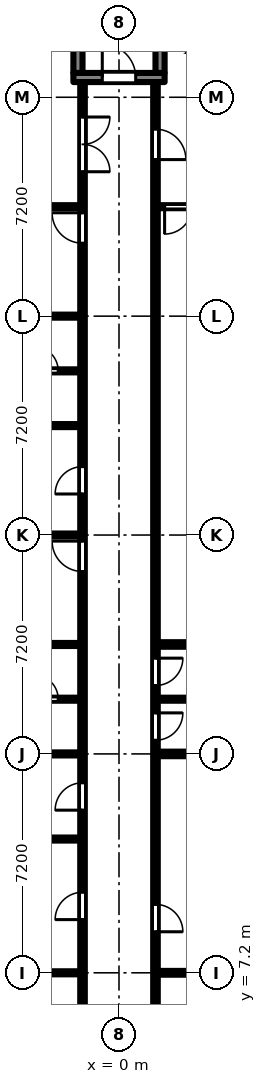
"""IFC4 building model, lengths in metres.
Left out: names, types, materials, properties, quantities, classifications, styles, units other than length and angle.
Written with IfcOpenShell. Run it as: python <this file> out.ifc"""

import sys

from ifc_helpers import new_model, si_unit, direction, frame, frame_2d, origin, place, context, subcontext, project, spatial, rectangle, extrude, element, fill, save


model = new_model("IFC4")
c1 = context("Model", 3, precision=1e-05, world=origin(), true_north=direction((0.0, 1.0)))
c2 = subcontext(c1, "Body", "Model", "MODEL_VIEW")
j1 = project(units=[si_unit("LENGTHUNIT", "METRE"), si_unit("PLANEANGLEUNIT", "RADIAN")], contexts=[c1])
p1 = place(None, origin())
s1 = spatial("IfcSite", under=j1, at=p1, CompositionType="ELEMENT")
p2 = place(p1, origin())
s2 = spatial("IfcBuilding", under=s1, at=p2, CompositionType="ELEMENT")
p3 = place(p2, frame((0.0, 0.0, 59.7)))
s3 = spatial("IfcBuildingStorey", under=s2, at=p3, CompositionType="ELEMENT", Elevation=59.7)
p4 = place(p3, frame((-1.5, 36.65, 0.0), z_axis=(0.0, 0.0, 1.0), x_axis=(1.0, 0.0, 0.0)))
e1 = element("IfcWall", 1, at=p4, inside=s3, PredefinedType="SHEAR", context=c2, shape_type="SweptSolid", body=[
    extrude(rectangle(XDim=3.0, YDim=0.3, at=frame_2d((1.5, 0.0))), origin(), (0.0, 0.0, 1.0), 2.55),
])
p5 = place(p4, frame((0.95, 0.0, 0.0)))
e2 = element("IfcOpeningElement", 2, at=p5, cuts=e1, PredefinedType="OPENING", context=c2, shape_type="SweptSolid", body=[
    extrude(rectangle(XDim=1.1, YDim=2.1, at=frame_2d((0.55, 1.05))), frame((0.0, 0.16, 0.0), z_axis=(0.0, -1.0, 0.0), x_axis=(1.0, 0.0, 0.0)), (0.0, 0.0, 1.0), 0.32),
])
for number, where, z_axis, x_axis in (
    (3, (-1.35, 36.8, 0.0), (0.0, 0.0, 1.0), (0.0, 1.0, 0.0)),
    (4, (1.35, 36.8, 0.0), (0.0, 0.0, 1.0), (0.0, 1.0, 0.0)),
):
    element("IfcWall", number, at=place(p3, frame(where, z_axis=z_axis, x_axis=x_axis)), inside=s3, PredefinedType="SHEAR", context=c2, shape_type="SweptSolid", body=[
        extrude(rectangle(XDim=5.8, YDim=0.3, at=frame_2d((2.9, 0.0))), origin(), (0.0, 0.0, 1.0), 2.55),
    ])
for number, where, z_axis, x_axis in (
    (5, (-6.9, 21.6, 0.0), (0.0, 0.0, 1.0), (1.0, 0.0, 0.0)),
    (6, (-6.9, 25.2, 0.0), (0.0, 0.0, 1.0), (1.0, 0.0, 0.0)),
    (7, (-6.9, 32.4, 0.0), (0.0, 0.0, 1.0), (1.0, 0.0, 0.0)),
):
    element("IfcWall", number, at=place(p3, frame(where, z_axis=z_axis, x_axis=x_axis)), inside=s3, PredefinedType="PARTITIONING", context=c2, shape_type="SweptSolid", body=[
        extrude(rectangle(XDim=5.625, YDim=0.1, at=frame_2d((2.812, 0.0))), origin(), (0.0, 0.0, 1.0), 2.55),
    ])
for number, where, z_axis, x_axis in (
    (8, (-3.9, 7.2, 0.0), (0.0, 0.0, 1.0), (1.0, 0.0, 0.0)),
    (9, (-3.9, 11.6, 0.0), (0.0, 0.0, 1.0), (1.0, 0.0, 0.0)),
    (10, (-3.9, 14.4, 0.0), (0.0, 0.0, 1.0), (1.0, 0.0, 0.0)),
):
    element("IfcWall", number, at=place(p3, frame(where, z_axis=z_axis, x_axis=x_axis)), inside=s3, PredefinedType="PARTITIONING", context=c2, shape_type="SweptSolid", body=[
        extrude(rectangle(XDim=2.625, YDim=0.1, at=frame_2d((1.312, 0.0))), origin(), (0.0, 0.0, 1.0), 2.55),
    ])
p6 = place(p3, frame((-3.55, 16.2, 0.0), z_axis=(0.0, 0.0, 1.0), x_axis=(1.0, 0.0, 0.0)))
e11 = element("IfcWall", 11, at=p6, inside=s3, PredefinedType="PARTITIONING", context=c2, shape_type="SweptSolid", body=[
    extrude(rectangle(XDim=2.275, YDim=0.1, at=frame_2d((1.138, 0.0))), origin(), (0.0, 0.0, 1.0), 2.55),
])
p7 = place(p6, frame((0.75, 0.0, 0.0)))
e12 = element("IfcOpeningElement", 12, at=p7, cuts=e11, PredefinedType="OPENING", context=c2, shape_type="SweptSolid", body=[
    extrude(rectangle(XDim=0.8, YDim=2.1, at=frame_2d((0.4, 1.05))), frame((0.0, 0.06, 0.0), z_axis=(0.0, -1.0, 0.0), x_axis=(1.0, 0.0, 0.0)), (0.0, 0.0, 1.0), 0.12),
])
p8 = place(p3, frame((-3.55, 18.0, 0.0), z_axis=(0.0, 0.0, 1.0), x_axis=(1.0, 0.0, 0.0)))
e13 = element("IfcWall", 13, at=p8, inside=s3, PredefinedType="PARTITIONING", context=c2, shape_type="SweptSolid", body=[
    extrude(rectangle(XDim=2.275, YDim=0.1, at=frame_2d((1.138, 0.0))), origin(), (0.0, 0.0, 1.0), 2.55),
])
p9 = place(p3, frame((-3.55, 27.0, 0.0), z_axis=(0.0, 0.0, 1.0), x_axis=(1.0, 0.0, 0.0)))
e14 = element("IfcWall", 14, at=p9, inside=s3, PredefinedType="PARTITIONING", context=c2, shape_type="SweptSolid", body=[
    extrude(rectangle(XDim=2.275, YDim=0.1, at=frame_2d((1.138, 0.0))), origin(), (0.0, 0.0, 1.0), 2.55),
])
p10 = place(p9, frame((0.75, 0.0, 0.0)))
e15 = element("IfcOpeningElement", 15, at=p10, cuts=e14, PredefinedType="OPENING", context=c2, shape_type="SweptSolid", body=[
    extrude(rectangle(XDim=0.8, YDim=2.1, at=frame_2d((0.4, 1.05))), frame((0.0, 0.06, 0.0), z_axis=(0.0, -1.0, 0.0), x_axis=(1.0, 0.0, 0.0)), (0.0, 0.0, 1.0), 0.12),
])
p11 = place(p3, frame((-3.55, 28.8, 0.0), z_axis=(0.0, 0.0, 1.0), x_axis=(1.0, 0.0, 0.0)))
e16 = element("IfcWall", 16, at=p11, inside=s3, PredefinedType="PARTITIONING", context=c2, shape_type="SweptSolid", body=[
    extrude(rectangle(XDim=2.275, YDim=0.1, at=frame_2d((1.138, 0.0))), origin(), (0.0, 0.0, 1.0), 2.55),
])
p12 = place(p3, frame((-1.2, 1.275, 0.0), z_axis=(0.0, 0.0, 1.0), x_axis=(0.0, 1.0, 0.0)))
e17 = element("IfcWall", 17, at=p12, inside=s3, PredefinedType="PARTITIONING", context=c2, shape_type="SweptSolid", body=[
    extrude(rectangle(XDim=35.225, YDim=0.15, at=frame_2d((17.613, 0.0))), origin(), (0.0, 0.0, 1.0), 2.55),
])
p13 = place(p12, frame((2.475, 0.0, 0.0)))
e18 = element("IfcOpeningElement", 18, at=p13, cuts=e17, PredefinedType="OPENING", context=c2, shape_type="SweptSolid", body=[
    extrude(rectangle(XDim=0.9, YDim=2.1, at=frame_2d((0.45, 1.05))), frame((0.0, 0.085, 0.0), z_axis=(0.0, -1.0, 0.0), x_axis=(1.0, 0.0, 0.0)), (0.0, 0.0, 1.0), 0.17),
])
p14 = place(p12, frame((11.275, 0.0, 0.0)))
e19 = element("IfcOpeningElement", 19, at=p14, cuts=e17, PredefinedType="OPENING", context=c2, shape_type="SweptSolid", body=[
    extrude(rectangle(XDim=0.9, YDim=2.1, at=frame_2d((0.45, 1.05))), frame((0.0, 0.085, 0.0), z_axis=(0.0, -1.0, 0.0), x_axis=(1.0, 0.0, 0.0)), (0.0, 0.0, 1.0), 0.17),
])
p15 = place(p12, frame((7.675, 0.0, 0.0)))
e20 = element("IfcOpeningElement", 20, at=p15, cuts=e17, PredefinedType="OPENING", context=c2, shape_type="SweptSolid", body=[
    extrude(rectangle(XDim=0.9, YDim=2.1, at=frame_2d((0.45, 1.05))), frame((0.0, 0.085, 0.0), z_axis=(0.0, -1.0, 0.0), x_axis=(1.0, 0.0, 0.0)), (0.0, 0.0, 1.0), 0.17),
])
p16 = place(p12, frame((19.125, 0.0, 0.0)))
e21 = element("IfcOpeningElement", 21, at=p16, cuts=e17, PredefinedType="OPENING", context=c2, shape_type="SweptSolid", body=[
    extrude(rectangle(XDim=1.0, YDim=2.1, at=frame_2d((0.5, 1.05))), frame((0.0, 0.085, 0.0), z_axis=(0.0, -1.0, 0.0), x_axis=(1.0, 0.0, 0.0)), (0.0, 0.0, 1.0), 0.17),
])
p17 = place(p12, frame((21.675, 0.0, 0.0)))
e22 = element("IfcOpeningElement", 22, at=p17, cuts=e17, PredefinedType="OPENING", context=c2, shape_type="SweptSolid", body=[
    extrude(rectangle(XDim=0.9, YDim=2.1, at=frame_2d((0.45, 1.05))), frame((0.0, 0.085, 0.0), z_axis=(0.0, -1.0, 0.0), x_axis=(1.0, 0.0, 0.0)), (0.0, 0.0, 1.0), 0.17),
])
p18 = place(p12, frame((29.925, 0.0, 0.0)))
e23 = element("IfcOpeningElement", 23, at=p18, cuts=e17, PredefinedType="OPENING", context=c2, shape_type="SweptSolid", body=[
    extrude(rectangle(XDim=1.0, YDim=2.1, at=frame_2d((0.5, 1.05))), frame((0.0, 0.085, 0.0), z_axis=(0.0, -1.0, 0.0), x_axis=(1.0, 0.0, 0.0)), (0.0, 0.0, 1.0), 0.17),
])
p19 = place(p12, frame((32.275, 0.0, 0.0)))
e24 = element("IfcOpeningElement", 24, at=p19, cuts=e17, PredefinedType="OPENING", context=c2, shape_type="SweptSolid", body=[
    extrude(rectangle(XDim=1.8, YDim=2.1, at=frame_2d((0.9, 1.05))), frame((0.0, 0.085, 0.0), z_axis=(0.0, -1.0, 0.0), x_axis=(1.0, 0.0, 0.0)), (0.0, 0.0, 1.0), 0.17),
])
p20 = place(p3, frame((1.2, 1.125, 0.0), z_axis=(0.0, 0.0, 1.0), x_axis=(0.0, 1.0, 0.0)))
e25 = element("IfcWall", 25, at=p20, inside=s3, PredefinedType="PARTITIONING", context=c2, shape_type="SweptSolid", body=[
    extrude(rectangle(XDim=35.375, YDim=0.15, at=frame_2d((17.688, 0.0))), origin(), (0.0, 0.0, 1.0), 2.55),
])
p21 = place(p20, frame((2.625, 0.0, 0.0)))
e26 = element("IfcOpeningElement", 26, at=p21, cuts=e25, PredefinedType="OPENING", context=c2, shape_type="SweptSolid", body=[
    extrude(rectangle(XDim=0.9, YDim=2.1, at=frame_2d((0.45, 1.05))), frame((0.0, 0.085, 0.0), z_axis=(0.0, -1.0, 0.0), x_axis=(1.0, 0.0, 0.0)), (0.0, 0.0, 1.0), 0.17),
])
p22 = place(p20, frame((7.425, 0.0, 0.0)))
e27 = element("IfcOpeningElement", 27, at=p22, cuts=e25, PredefinedType="OPENING", context=c2, shape_type="SweptSolid", body=[
    extrude(rectangle(XDim=0.9, YDim=2.1, at=frame_2d((0.45, 1.05))), frame((0.0, 0.085, 0.0), z_axis=(0.0, -1.0, 0.0), x_axis=(1.0, 0.0, 0.0)), (0.0, 0.0, 1.0), 0.17),
])
p23 = place(p20, frame((13.725, 0.0, 0.0)))
e28 = element("IfcOpeningElement", 28, at=p23, cuts=e25, PredefinedType="OPENING", context=c2, shape_type="SweptSolid", body=[
    extrude(rectangle(XDim=0.9, YDim=2.1, at=frame_2d((0.45, 1.05))), frame((0.0, 0.085, 0.0), z_axis=(0.0, -1.0, 0.0), x_axis=(1.0, 0.0, 0.0)), (0.0, 0.0, 1.0), 0.17),
])
p24 = place(p20, frame((15.525, 0.0, 0.0)))
e29 = element("IfcOpeningElement", 29, at=p24, cuts=e25, PredefinedType="OPENING", context=c2, shape_type="SweptSolid", body=[
    extrude(rectangle(XDim=0.9, YDim=2.1, at=frame_2d((0.45, 1.05))), frame((0.0, 0.085, 0.0), z_axis=(0.0, -1.0, 0.0), x_axis=(1.0, 0.0, 0.0)), (0.0, 0.0, 1.0), 0.17),
])
p25 = place(p20, frame((32.825, 0.0, 0.0)))
e30 = element("IfcOpeningElement", 30, at=p25, cuts=e25, PredefinedType="OPENING", context=c2, shape_type="SweptSolid", body=[
    extrude(rectangle(XDim=1.0, YDim=2.1, at=frame_2d((0.5, 1.05))), frame((0.0, 0.085, 0.0), z_axis=(0.0, -1.0, 0.0), x_axis=(1.0, 0.0, 0.0)), (0.0, 0.0, 1.0), 0.17),
])
p26 = place(p3, frame((1.275, 7.2, 0.0), z_axis=(0.0, 0.0, 1.0), x_axis=(1.0, 0.0, 0.0)))
e31 = element("IfcWall", 31, at=p26, inside=s3, PredefinedType="PARTITIONING", context=c2, shape_type="SweptSolid", body=[
    extrude(rectangle(XDim=2.625, YDim=0.125, at=frame_2d((1.312, 0.0))), origin(), (0.0, 0.0, 1.0), 2.55),
])
p27 = place(p3, frame((1.275, 14.4, 0.0), z_axis=(0.0, 0.0, 1.0), x_axis=(1.0, 0.0, 0.0)))
e32 = element("IfcWall", 32, at=p27, inside=s3, PredefinedType="PARTITIONING", context=c2, shape_type="SweptSolid", body=[
    extrude(rectangle(XDim=2.625, YDim=0.15, at=frame_2d((1.312, 0.0))), origin(), (0.0, 0.0, 1.0), 2.55),
])
p28 = place(p3, frame((1.275, 16.2, 0.0), z_axis=(0.0, 0.0, 1.0), x_axis=(1.0, 0.0, 0.0)))
e33 = element("IfcWall", 33, at=p28, inside=s3, PredefinedType="PARTITIONING", context=c2, shape_type="SweptSolid", body=[
    extrude(rectangle(XDim=5.625, YDim=0.1, at=frame_2d((2.812, 0.0))), origin(), (0.0, 0.0, 1.0), 2.55),
])
p29 = place(p3, frame((1.275, 18.0, 0.0), z_axis=(0.0, 0.0, 1.0), x_axis=(1.0, 0.0, 0.0)))
e34 = element("IfcWall", 34, at=p29, inside=s3, PredefinedType="PARTITIONING", context=c2, shape_type="SweptSolid", body=[
    extrude(rectangle(XDim=5.625, YDim=0.15, at=frame_2d((2.812, 0.0))), origin(), (0.0, 0.0, 1.0), 2.55),
])
p30 = place(p3, frame((1.275, 32.4, 0.0), z_axis=(0.0, 0.0, 1.0), x_axis=(1.0, 0.0, 0.0)))
e35 = element("IfcWall", 35, at=p30, inside=s3, PredefinedType="PARTITIONING", context=c2, shape_type="SweptSolid", body=[
    extrude(rectangle(XDim=5.625, YDim=0.1, at=frame_2d((2.812, 0.0))), origin(), (0.0, 0.0, 1.0), 2.55),
])
p31 = place(p30, frame((0.225, 0.0, 0.0)))
e36 = element("IfcOpeningElement", 36, at=p31, cuts=e35, PredefinedType="OPENING", context=c2, shape_type="SweptSolid", body=[
    extrude(rectangle(XDim=0.9, YDim=2.1, at=frame_2d((0.45, 1.05))), frame((0.0, 0.06, 0.0), z_axis=(0.0, -1.0, 0.0), x_axis=(1.0, 0.0, 0.0)), (0.0, 0.0, 1.0), 0.12),
])
p32 = place(p5, origin())
e37 = element("IfcDoor", 37, at=p32, inside=s3, OperationType="SINGLE_SWING_LEFT", PredefinedType="DOOR", context=c2, shape_type="SweptSolid", body=[
    extrude(rectangle(XDim=1.1, YDim=2.1, at=frame_2d((0.55, 1.05))), frame((0.0, 0.025, 0.0), z_axis=(0.0, -1.0, 0.0), x_axis=(1.0, 0.0, 0.0)), (0.0, 0.0, 1.0), 0.05),
])
fill(e2, e37)
p33 = place(p14, origin())
e38 = element("IfcDoor", 38, at=p33, inside=s3, OperationType="SINGLE_SWING_LEFT", PredefinedType="DOOR", context=c2, shape_type="SweptSolid", body=[
    extrude(rectangle(XDim=0.9, YDim=2.1, at=frame_2d((0.45, 1.05))), frame((0.0, 0.025, 0.0), z_axis=(0.0, -1.0, 0.0), x_axis=(1.0, 0.0, 0.0)), (0.0, 0.0, 1.0), 0.05),
])
fill(e19, e38)
p34 = place(p15, origin())
e39 = element("IfcDoor", 39, at=p34, inside=s3, OperationType="SINGLE_SWING_LEFT", PredefinedType="DOOR", context=c2, shape_type="SweptSolid", body=[
    extrude(rectangle(XDim=0.9, YDim=2.1, at=frame_2d((0.45, 1.05))), frame((0.0, 0.025, 0.0), z_axis=(0.0, -1.0, 0.0), x_axis=(1.0, 0.0, 0.0)), (0.0, 0.0, 1.0), 0.05),
])
fill(e20, e39)
p35 = place(p7, origin())
e40 = element("IfcDoor", 40, at=p35, inside=s3, OperationType="SINGLE_SWING_LEFT", PredefinedType="DOOR", context=c2, shape_type="SweptSolid", body=[
    extrude(rectangle(XDim=0.8, YDim=2.1, at=frame_2d((0.4, 1.05))), frame((0.0, 0.025, 0.0), z_axis=(0.0, -1.0, 0.0), x_axis=(1.0, 0.0, 0.0)), (0.0, 0.0, 1.0), 0.05),
])
fill(e12, e40)
p36 = place(p16, origin())
e41 = element("IfcDoor", 41, at=p36, inside=s3, OperationType="SINGLE_SWING_RIGHT", PredefinedType="DOOR", context=c2, shape_type="SweptSolid", body=[
    extrude(rectangle(XDim=1.0, YDim=2.1, at=frame_2d((0.5, 1.05))), frame((0.0, 0.025, 0.0), z_axis=(0.0, -1.0, 0.0), x_axis=(1.0, 0.0, 0.0)), (0.0, 0.0, 1.0), 0.05),
])
fill(e21, e41)
p37 = place(p17, origin())
e42 = element("IfcDoor", 42, at=p37, inside=s3, OperationType="SINGLE_SWING_LEFT", PredefinedType="DOOR", context=c2, shape_type="SweptSolid", body=[
    extrude(rectangle(XDim=0.9, YDim=2.1, at=frame_2d((0.45, 1.05))), frame((0.0, 0.025, 0.0), z_axis=(0.0, -1.0, 0.0), x_axis=(1.0, 0.0, 0.0)), (0.0, 0.0, 1.0), 0.05),
])
fill(e22, e42)
p38 = place(p10, origin())
e43 = element("IfcDoor", 43, at=p38, inside=s3, OperationType="SINGLE_SWING_LEFT", PredefinedType="DOOR", context=c2, shape_type="SweptSolid", body=[
    extrude(rectangle(XDim=0.8, YDim=2.1, at=frame_2d((0.4, 1.05))), frame((0.0, 0.025, 0.0), z_axis=(0.0, -1.0, 0.0), x_axis=(1.0, 0.0, 0.0)), (0.0, 0.0, 1.0), 0.05),
])
fill(e15, e43)
p39 = place(p18, origin())
e44 = element("IfcDoor", 44, at=p39, inside=s3, OperationType="SINGLE_SWING_RIGHT", PredefinedType="DOOR", context=c2, shape_type="SweptSolid", body=[
    extrude(rectangle(XDim=1.0, YDim=2.1, at=frame_2d((0.5, 1.05))), frame((0.0, 0.025, 0.0), z_axis=(0.0, -1.0, 0.0), x_axis=(1.0, 0.0, 0.0)), (0.0, 0.0, 1.0), 0.05),
])
fill(e23, e44)
p40 = place(p19, frame((1.8, 0.0, 0.0), z_axis=(0.0, 0.0, 1.0), x_axis=(-1.0, 0.0, 0.0)))
e45 = element("IfcDoor", 45, at=p40, inside=s3, OperationType="DOUBLE_DOOR_DOUBLE_SWING", PredefinedType="DOOR", context=c2, shape_type="SweptSolid", body=[
    extrude(rectangle(XDim=1.8, YDim=2.1, at=frame_2d((0.9, 1.05))), frame((0.0, 0.025, 0.0), z_axis=(0.0, -1.0, 0.0), x_axis=(1.0, 0.0, 0.0)), (0.0, 0.0, 1.0), 0.05),
])
fill(e24, e45)
p41 = place(p22, frame((0.9, 0.0, 0.0), z_axis=(0.0, 0.0, 1.0), x_axis=(-1.0, 0.0, 0.0)))
e46 = element("IfcDoor", 46, at=p41, inside=s3, OperationType="SINGLE_SWING_RIGHT", PredefinedType="DOOR", context=c2, shape_type="SweptSolid", body=[
    extrude(rectangle(XDim=0.9, YDim=2.1, at=frame_2d((0.45, 1.05))), frame((0.0, 0.025, 0.0), z_axis=(0.0, -1.0, 0.0), x_axis=(1.0, 0.0, 0.0)), (0.0, 0.0, 1.0), 0.05),
])
fill(e27, e46)
p42 = place(p23, frame((0.9, 0.0, 0.0), z_axis=(0.0, 0.0, 1.0), x_axis=(-1.0, 0.0, 0.0)))
e47 = element("IfcDoor", 47, at=p42, inside=s3, OperationType="SINGLE_SWING_LEFT", PredefinedType="DOOR", context=c2, shape_type="SweptSolid", body=[
    extrude(rectangle(XDim=0.9, YDim=2.1, at=frame_2d((0.45, 1.05))), frame((0.0, 0.025, 0.0), z_axis=(0.0, -1.0, 0.0), x_axis=(1.0, 0.0, 0.0)), (0.0, 0.0, 1.0), 0.05),
])
fill(e28, e47)
p43 = place(p24, frame((0.9, 0.0, 0.0), z_axis=(0.0, 0.0, 1.0), x_axis=(-1.0, 0.0, 0.0)))
e48 = element("IfcDoor", 48, at=p43, inside=s3, OperationType="SINGLE_SWING_LEFT", PredefinedType="DOOR", context=c2, shape_type="SweptSolid", body=[
    extrude(rectangle(XDim=0.9, YDim=2.1, at=frame_2d((0.45, 1.05))), frame((0.0, 0.025, 0.0), z_axis=(0.0, -1.0, 0.0), x_axis=(1.0, 0.0, 0.0)), (0.0, 0.0, 1.0), 0.05),
])
fill(e29, e48)
p44 = place(p25, frame((1.0, 0.0, 0.0), z_axis=(0.0, 0.0, 1.0), x_axis=(-1.0, 0.0, 0.0)))
e49 = element("IfcDoor", 49, at=p44, inside=s3, OperationType="SINGLE_SWING_RIGHT", PredefinedType="DOOR", context=c2, shape_type="SweptSolid", body=[
    extrude(rectangle(XDim=1.0, YDim=2.1, at=frame_2d((0.5, 1.05))), frame((0.0, 0.025, 0.0), z_axis=(0.0, -1.0, 0.0), x_axis=(1.0, 0.0, 0.0)), (0.0, 0.0, 1.0), 0.05),
])
fill(e30, e49)
p45 = place(p31, frame((0.9, 0.0, 0.0), z_axis=(0.0, 0.0, 1.0), x_axis=(-1.0, 0.0, 0.0)))
e50 = element("IfcDoor", 50, at=p45, inside=s3, OperationType="SINGLE_SWING_RIGHT", PredefinedType="DOOR", context=c2, shape_type="SweptSolid", body=[
    extrude(rectangle(XDim=0.9, YDim=2.1, at=frame_2d((0.45, 1.05))), frame((0.0, 0.025, 0.0), z_axis=(0.0, -1.0, 0.0), x_axis=(1.0, 0.0, 0.0)), (0.0, 0.0, 1.0), 0.05),
])
fill(e36, e50)
save(model, sys.argv[1])
